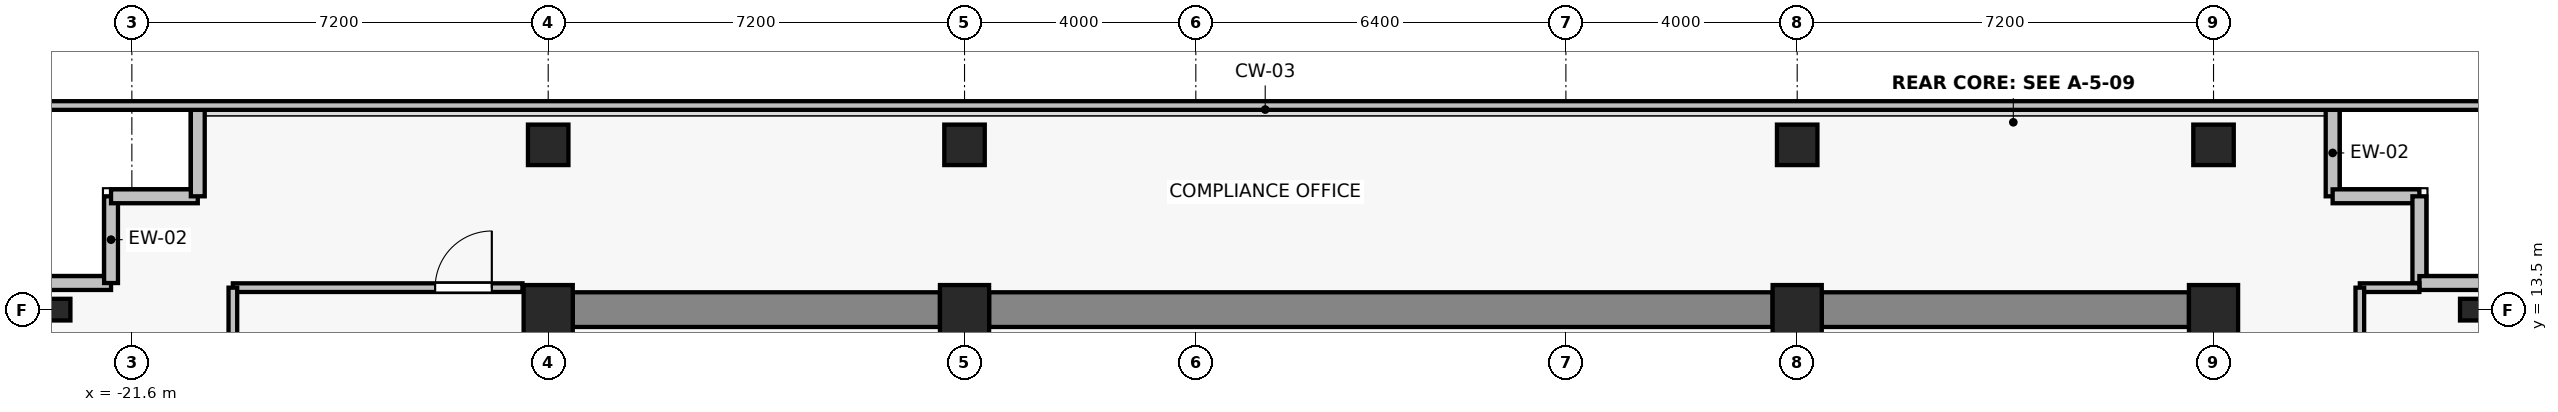
"""IFC4 building model, lengths in metres.
Left out: names, types, materials, properties, quantities, classifications, styles, units other than length and angle.
Written with IfcOpenShell. Run it as: python <this file> out.ifc"""

import sys

from ifc_helpers import new_model, si_unit, direction, frame, frame_2d, origin, origin_2d, place, context, subcontext, project, spatial, rectangle, i_section, extrude, source, transform, mapped, element, fill, save


model = new_model("IFC4")
c1 = context("Model", 3, precision=1e-05, world=origin(), true_north=direction((0.0, 1.0)))
c2 = subcontext(c1, "Body", "Model", "MODEL_VIEW")
j1 = project(units=[si_unit("LENGTHUNIT", "METRE"), si_unit("PLANEANGLEUNIT", "RADIAN")], contexts=[c1])
p1 = place(None, origin())
s1 = spatial("IfcSite", under=j1, at=p1, CompositionType="ELEMENT")
p2 = place(p1, origin())
s2 = spatial("IfcBuilding", under=s1, at=p2, CompositionType="ELEMENT")
p3 = place(p2, frame((0.0, 0.0, 225.4)))
s3 = spatial("IfcBuildingStorey", under=s2, at=p3, CompositionType="ELEMENT", Elevation=225.4)
for number, where, z_axis, x_axis in (
    (1, (-14.4, 13.5, 0.0), (0.0, 0.0, 1.0), (1.0, 0.0, 0.0)),
    (2, (-7.2, 13.5, 0.0), (0.0, 0.0, 1.0), (1.0, 0.0, 0.0)),
    (3, (7.2, 13.5, 0.0), (0.0, 0.0, 1.0), (1.0, 0.0, 0.0)),
    (4, (14.4, 13.5, 0.0), (0.0, 0.0, 1.0), (1.0, 0.0, 0.0)),
):
    element("IfcColumn", number, at=place(p3, frame(where, z_axis=z_axis, x_axis=x_axis)), inside=s3, PredefinedType="COLUMN", context=c2, shape_type="SweptSolid", body=[
        extrude(rectangle(XDim=0.85, YDim=0.85, at=origin_2d()), origin(), (0.0, 0.0, 1.0), 3.3),
    ])
for number, where, z_axis, x_axis in (
    (5, (-14.4, 16.35, 0.0), (0.0, 0.0, 1.0), (1.0, 0.0, 0.0)),
    (6, (-7.2, 16.35, 0.0), (0.0, 0.0, 1.0), (1.0, 0.0, 0.0)),
    (7, (7.2, 16.35, 0.0), (0.0, 0.0, 1.0), (1.0, 0.0, 0.0)),
    (8, (14.4, 16.35, 0.0), (0.0, 0.0, 1.0), (1.0, 0.0, 0.0)),
):
    element("IfcColumn", number, at=place(p3, frame(where, z_axis=z_axis, x_axis=x_axis)), inside=s3, PredefinedType="COLUMN", context=c2, shape_type="SweptSolid", body=[
        extrude(rectangle(XDim=0.7, YDim=0.7, at=origin_2d()), origin(), (0.0, 0.0, 1.0), 3.3),
    ])
for number, where, z_axis, x_axis in (
    (9, (-22.85, 13.5, 0.0), (0.0, 0.0, 1.0), (1.0, 0.0, 0.0)),
    (10, (18.85, 13.5, 0.0), (0.0, 0.0, 1.0), (1.0, 0.0, 0.0)),
):
    element("IfcColumn", number, at=place(p3, frame(where, z_axis=z_axis, x_axis=x_axis)), inside=s3, PredefinedType="COLUMN", context=c2, shape_type="SweptSolid", body=[
        extrude(i_section(OverallWidth=0.375, OverallDepth=0.375, WebThickness=0.017, FlangeThickness=0.027, FilletRadius=0.015, at=origin_2d()), origin(), (0.0, 0.0, 1.0), 3.3),
    ])
p4 = place(p3, frame((-13.975, 13.5, 0.0), z_axis=(0.0, 0.0, 1.0), x_axis=(1.0, 0.0, 0.0)))
e11 = element("IfcWall", 11, at=p4, inside=s3, PredefinedType="SHEAR", context=c2, shape_type="SweptSolid", body=[
    extrude(rectangle(XDim=6.35, YDim=0.6, at=frame_2d((3.175, 0.0))), origin(), (0.0, 0.0, 1.0), 3.075),
])
p5 = place(p3, frame((-6.775, 13.5, 0.0), z_axis=(0.0, 0.0, 1.0), x_axis=(1.0, 0.0, 0.0)))
e12 = element("IfcWall", 12, at=p5, inside=s3, PredefinedType="SHEAR", context=c2, shape_type="SweptSolid", body=[
    extrude(rectangle(XDim=13.55, YDim=0.6, at=frame_2d((6.775, 0.0))), origin(), (0.0, 0.0, 1.0), 3.075),
])
p6 = place(p3, frame((7.625, 13.5, 0.0), z_axis=(0.0, 0.0, 1.0), x_axis=(1.0, 0.0, 0.0)))
e13 = element("IfcWall", 13, at=p6, inside=s3, PredefinedType="SHEAR", context=c2, shape_type="SweptSolid", body=[
    extrude(rectangle(XDim=6.35, YDim=0.6, at=frame_2d((3.175, 0.0))), origin(), (0.0, 0.0, 1.0), 3.075),
])
for number, where, z_axis, x_axis in (
    (14, (-21.96, 13.96, 0.0), (0.0, 0.0, 1.0), (-1.0, 0.0, 0.0)),
    (15, (-21.96, 15.46, 0.0), (0.0, 0.0, 1.0), (0.0, -1.0, 0.0)),
    (16, (-20.46, 15.46, 0.0), (0.0, 0.0, 1.0), (-1.0, 0.0, 0.0)),
    (17, (-20.46, 16.96, 0.0), (0.0, 0.0, 1.0), (0.0, -1.0, 0.0)),
    (18, (16.46, 15.46, 0.0), (0.0, 0.0, 1.0), (0.0, 1.0, 0.0)),
    (19, (17.96, 15.46, 0.0), (0.0, 0.0, 1.0), (-1.0, 0.0, 0.0)),
    (20, (17.96, 13.96, 0.0), (0.0, 0.0, 1.0), (0.0, 1.0, 0.0)),
    (21, (19.46, 13.96, 0.0), (0.0, 0.0, 1.0), (-1.0, 0.0, 0.0)),
):
    element("IfcWall", number, at=place(p3, frame(where, z_axis=z_axis, x_axis=x_axis)), inside=s3, PredefinedType="SOLIDWALL", context=c2, shape_type="SweptSolid", body=[
        extrude(rectangle(XDim=1.5, YDim=0.24, at=frame_2d((0.75, 0.0))), origin(), (0.0, 0.0, 1.0), 3.075),
    ])
p7 = place(p3, frame((-19.853, 13.88, 0.0), z_axis=(0.0, 0.0, 1.0), x_axis=(1.0, 0.0, 0.0)))
e22 = element("IfcWall", 22, at=p7, inside=s3, PredefinedType="PARTITIONING", context=c2, shape_type="SweptSolid", body=[
    extrude(rectangle(XDim=5.008, YDim=0.15, at=frame_2d((2.504, 0.0))), origin(), (0.0, 0.0, 1.0), 3.075),
])
p8 = place(p7, frame((3.498, 0.0, 0.0)))
e23 = element("IfcOpeningElement", 23, at=p8, cuts=e22, PredefinedType="OPENING", context=c2, shape_type="SweptSolid", body=[
    extrude(rectangle(XDim=0.98, YDim=2.15, at=frame_2d((0.49, 1.075))), frame((0.0, 0.085, 0.0), z_axis=(0.0, -1.0, 0.0), x_axis=(1.0, 0.0, 0.0)), (0.0, 0.0, 1.0), 0.17),
])
p9 = place(p3, frame((-19.853, -1.77, 0.0), z_axis=(0.0, 0.0, 1.0), x_axis=(0.0, 1.0, 0.0)))
e24 = element("IfcWall", 24, at=p9, inside=s3, PredefinedType="PARTITIONING", context=c2, shape_type="SweptSolid", body=[
    extrude(rectangle(XDim=15.65, YDim=0.15, at=frame_2d((7.825, 0.0))), origin(), (0.0, 0.0, 1.0), 2.615),
])
p10 = place(p3, frame((16.93, 13.88, 0.0), z_axis=(0.0, 0.0, 1.0), x_axis=(1.0, 0.0, 0.0)))
e25 = element("IfcWall", 25, at=p10, inside=s3, PredefinedType="PARTITIONING", context=c2, shape_type="SweptSolid", body=[
    extrude(rectangle(XDim=1.03, YDim=0.15, at=frame_2d((0.515, 0.0))), origin(), (0.0, 0.0, 1.0), 3.075),
])
p11 = place(p3, frame((16.93, -1.77, 0.0), z_axis=(0.0, 0.0, 1.0), x_axis=(0.0, 1.0, 0.0)))
e26 = element("IfcWall", 26, at=p11, inside=s3, PredefinedType="PARTITIONING", context=c2, shape_type="SweptSolid", body=[
    extrude(rectangle(XDim=15.65, YDim=0.15, at=frame_2d((7.825, 0.0))), origin(), (0.0, 0.0, 1.0), 2.615),
])
p12 = place(p11, frame((7.335, 0.0, 0.0)))
e27 = element("IfcOpeningElement", 27, at=p12, cuts=e26, PredefinedType="OPENING", context=c2, shape_type="SweptSolid", body=[
    extrude(rectangle(XDim=0.98, YDim=2.15, at=frame_2d((0.49, 1.075))), frame((0.0, 0.085, 0.0), z_axis=(0.0, -1.0, 0.0), x_axis=(1.0, 0.0, 0.0)), (0.0, 0.0, 1.0), 0.17),
])
p13 = place(p3, frame((-23.53, 17.03, 0.0), z_axis=(0.0, 0.0, 1.0), x_axis=(1.0, 0.0, 0.0)))
e28 = element("IfcWall", 28, at=p13, inside=s3, PredefinedType="PARTITIONING", context=c2, shape_type="SweptSolid", body=[
    extrude(rectangle(XDim=43.06, YDim=0.15, at=frame_2d((21.53, 0.0))), origin(), (0.0, 0.0, 1.0), 3.075),
])
m1 = source(origin(), c2, "Body", "SweptSolid", [
    extrude(rectangle(XDim=0.98, YDim=2.15, at=frame_2d((0.49, 1.075))), frame((0.0, 0.025, 0.0), z_axis=(0.0, -1.0, 0.0), x_axis=(1.0, 0.0, 0.0)), (0.0, 0.0, 1.0), 0.05),
])
p14 = place(p8, origin())
e29 = element("IfcDoor", 29, at=p14, inside=s3, OperationType="SINGLE_SWING_RIGHT", PredefinedType="DOOR", context=c2, shape_type="MappedRepresentation", body=[
    mapped(m1, transform((0.0, 0.0, 0.0), x_axis=(1.0, 0.0, 0.0), y_axis=(0.0, 1.0, 0.0), z_axis=(0.0, 0.0, 1.0), scale=1.0)),
])
fill(e23, e29)
save(model, sys.argv[1])
